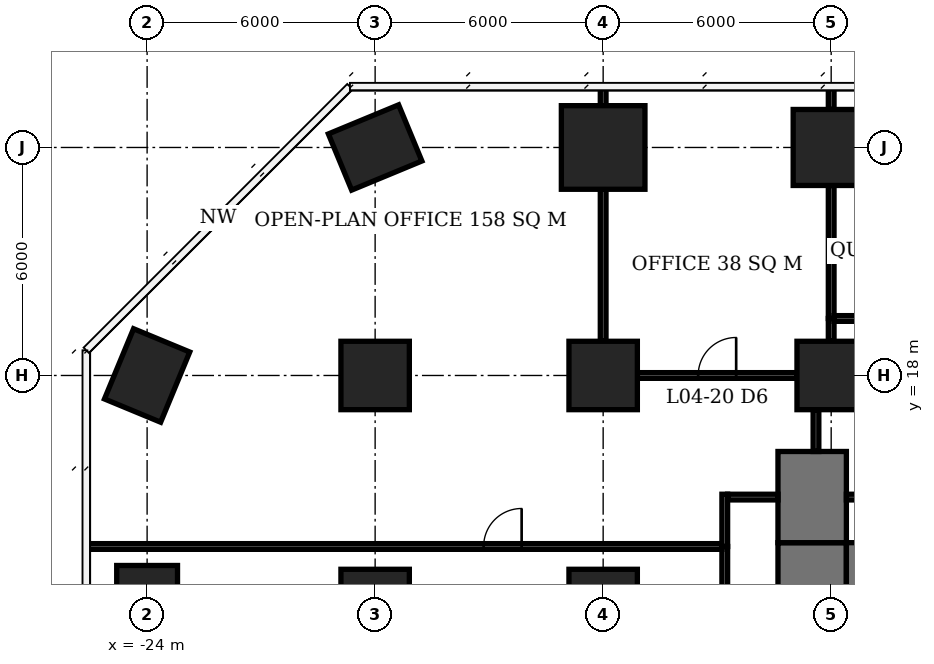
"""IFC4 building model, lengths in metres.
Left out: names, types, materials, properties, quantities, classifications, styles, units other than length and angle.
Written with IfcOpenShell. Run it as: python <this file> out.ifc"""

import sys

from ifc_helpers import new_model, si_unit, direction, frame, frame_2d, origin, origin_2d, place, context, subcontext, project, spatial, rectangle, extrude, element, fill, save


model = new_model("IFC4")
c1 = context("Model", 3, precision=1e-05, world=origin(), true_north=direction((0.0, 1.0)))
c2 = subcontext(c1, "Body", "Model", "MODEL_VIEW")
j1 = project(units=[si_unit("LENGTHUNIT", "METRE"), si_unit("PLANEANGLEUNIT", "RADIAN")], contexts=[c1])
p1 = place(None, origin())
s1 = spatial("IfcSite", under=j1, at=p1, CompositionType="ELEMENT")
p2 = place(p1, origin())
s2 = spatial("IfcBuilding", under=s1, at=p2, CompositionType="ELEMENT")
p3 = place(p2, frame((0.0, 0.0, 22.1)))
s3 = spatial("IfcBuildingStorey", under=s2, at=p3, CompositionType="ELEMENT", Elevation=22.1)
for number, where, z_axis, x_axis in (
    (1, (-24.0, 12.0, 0.0), (0.0, 0.0, 1.0), (0.0, 1.0, 0.0)),
    (2, (-24.0, 18.0, 0.0), (0.0, 0.0, 1.0), (0.383, 0.924, 0.0)),
):
    element("IfcColumn", number, at=place(p3, frame(where, z_axis=z_axis, x_axis=x_axis)), inside=s3, PredefinedType="COLUMN", context=c2, shape_type="SweptSolid", body=[
        extrude(rectangle(XDim=2.0, YDim=1.6, at=origin_2d()), origin(), (0.0, 0.0, 1.0), 3.9),
    ])
for number, where, z_axis, x_axis in (
    (3, (-18.0, 12.0, 0.0), (0.0, 0.0, 1.0), (1.0, 0.0, 0.0)),
    (4, (-18.0, 18.0, 0.0), (0.0, 0.0, 1.0), (1.0, 0.0, 0.0)),
):
    element("IfcColumn", number, at=place(p3, frame(where, z_axis=z_axis, x_axis=x_axis)), inside=s3, PredefinedType="COLUMN", context=c2, shape_type="SweptSolid", body=[
        extrude(rectangle(XDim=1.8, YDim=1.8, at=origin_2d()), origin(), (0.0, 0.0, 1.0), 3.9),
    ])
p4 = place(p3, frame((-18.0, 24.0, 0.0), z_axis=(0.0, 0.0, 1.0), x_axis=(0.923879532511, 0.382683432365, 0.0)))
e5 = element("IfcColumn", 5, at=p4, inside=s3, PredefinedType="COLUMN", context=c2, shape_type="SweptSolid", body=[
    extrude(rectangle(XDim=2.0, YDim=1.6, at=origin_2d()), origin(), (0.0, 0.0, 1.0), 3.9),
])
for number, where, z_axis, x_axis in (
    (6, (-12.0, 12.0, 0.0), (0.0, 0.0, 1.0), (1.0, 0.0, 0.0)),
    (7, (-12.0, 18.0, 0.0), (0.0, 0.0, 1.0), (1.0, 0.0, 0.0)),
):
    element("IfcColumn", number, at=place(p3, frame(where, z_axis=z_axis, x_axis=x_axis)), inside=s3, PredefinedType="COLUMN", context=c2, shape_type="SweptSolid", body=[
        extrude(rectangle(XDim=1.8, YDim=1.8, at=origin_2d()), origin(), (0.0, 0.0, 1.0), 3.9),
    ])
p5 = place(p3, frame((-12.0, 24.0, 0.0), z_axis=(0.0, 0.0, 1.0), x_axis=(1.0, 0.0, 0.0)))
e8 = element("IfcColumn", 8, at=p5, inside=s3, PredefinedType="COLUMN", context=c2, shape_type="SweptSolid", body=[
    extrude(rectangle(XDim=2.2, YDim=2.2, at=origin_2d()), origin(), (0.0, 0.0, 1.0), 3.9),
])
p6 = place(p3, frame((-6.0, 18.0, 0.0), z_axis=(0.0, 0.0, 1.0), x_axis=(1.0, 0.0, 0.0)))
e9 = element("IfcColumn", 9, at=p6, inside=s3, PredefinedType="COLUMN", context=c2, shape_type="SweptSolid", body=[
    extrude(rectangle(XDim=1.8, YDim=1.8, at=origin_2d()), origin(), (0.0, 0.0, 1.0), 3.9),
])
p7 = place(p3, frame((-6.0, 24.0, 0.0), z_axis=(0.0, 0.0, 1.0), x_axis=(1.0, 0.0, 0.0)))
e10 = element("IfcColumn", 10, at=p7, inside=s3, PredefinedType="COLUMN", context=c2, shape_type="SweptSolid", body=[
    extrude(rectangle(XDim=2.0, YDim=2.0, at=origin_2d()), origin(), (0.0, 0.0, 1.0), 3.9),
])
p8 = place(p3, frame((-5.6, 12.6, 0.0), z_axis=(0.0, 0.0, 1.0), x_axis=(1.0, 0.0, 0.0)))
e11 = element("IfcWall", 11, at=p8, inside=s3, PredefinedType="SHEAR", context=c2, shape_type="SweptSolid", body=[
    extrude(rectangle(XDim=23.2, YDim=2.0, at=frame_2d((11.6, 0.0))), origin(), (0.0, 0.0, 1.0), 3.9),
])
p9 = place(p3, frame((-6.5, -7.6, 0.0), z_axis=(0.0, 0.0, 1.0), x_axis=(0.0, 1.0, 0.0)))
e12 = element("IfcWall", 12, at=p9, inside=s3, PredefinedType="SHEAR", context=c2, shape_type="SweptSolid", body=[
    extrude(rectangle(XDim=21.2, YDim=1.8, at=frame_2d((10.6, 0.0))), origin(), (0.0, 0.0, 1.0), 3.9),
])
p10 = place(p9, frame((7.8, 0.0, 0.0)))
e13 = element("IfcOpeningElement", 13, at=p10, cuts=e12, PredefinedType="OPENING", context=c2, shape_type="SweptSolid", body=[
    extrude(rectangle(XDim=1.8, YDim=2.4, at=frame_2d((0.9, 1.2))), frame((0.0, 0.91, 0.0), z_axis=(0.0, -1.0, 0.0), x_axis=(1.0, 0.0, 0.0)), (0.0, 0.0, 1.0), 1.82),
])
p11 = place(p3, frame((-6.5, 13.6, 0.0), z_axis=(0.0, 0.0, 1.0), x_axis=(0.0, 1.0, 0.0)))
e14 = element("IfcWall", 14, at=p11, inside=s3, PredefinedType="SHEAR", context=c2, shape_type="SweptSolid", body=[
    extrude(rectangle(XDim=2.4, YDim=1.8, at=frame_2d((1.2, 0.0))), origin(), (0.0, 0.0, 1.0), 3.9),
])
p12 = place(p3, frame((-11.1, 18.0, 0.0), z_axis=(0.0, 0.0, 1.0), x_axis=(1.0, 0.0, 0.0)))
e15 = element("IfcWall", 15, at=p12, inside=s3, PredefinedType="PARTITIONING", context=c2, shape_type="SweptSolid", body=[
    extrude(rectangle(XDim=4.2, YDim=0.15, at=frame_2d((2.1, 0.0))), origin(), (0.0, 0.0, 1.0), 3.65),
])
p13 = place(p12, frame((1.6, 0.0, 0.0)))
e16 = element("IfcOpeningElement", 16, at=p13, cuts=e15, PredefinedType="OPENING", context=c2, shape_type="SweptSolid", body=[
    extrude(rectangle(XDim=1.0, YDim=2.1, at=frame_2d((0.5, 1.05))), frame((0.0, 0.085, 0.0), z_axis=(0.0, -1.0, 0.0), x_axis=(1.0, 0.0, 0.0)), (0.0, 0.0, 1.0), 0.17),
])
p14 = place(p3, frame((-5.925, 19.5, 0.0), z_axis=(0.0, 0.0, 1.0), x_axis=(1.0, 0.0, 0.0)))
e17 = element("IfcWall", 17, at=p14, inside=s3, PredefinedType="PARTITIONING", context=c2, shape_type="SweptSolid", body=[
    extrude(rectangle(XDim=5.85, YDim=0.15, at=frame_2d((2.925, 0.0))), origin(), (0.0, 0.0, 1.0), 3.65),
])
p15 = place(p14, frame((2.425, 0.0, 0.0)))
e18 = element("IfcOpeningElement", 18, at=p15, cuts=e17, PredefinedType="OPENING", context=c2, shape_type="SweptSolid", body=[
    extrude(rectangle(XDim=1.0, YDim=2.1, at=frame_2d((0.5, 1.05))), frame((0.0, 0.085, 0.0), z_axis=(0.0, -1.0, 0.0), x_axis=(1.0, 0.0, 0.0)), (0.0, 0.0, 1.0), 0.17),
])
p16 = place(p3, frame((-12.0, 18.9, 0.0), z_axis=(0.0, 0.0, 1.0), x_axis=(0.0, 1.0, 0.0)))
e19 = element("IfcWall", 19, at=p16, inside=s3, PredefinedType="PARTITIONING", context=c2, shape_type="SweptSolid", body=[
    extrude(rectangle(XDim=4.0, YDim=0.15, at=frame_2d((2.0, 0.0))), origin(), (0.0, 0.0, 1.0), 3.65),
])
p17 = place(p3, frame((-12.0, 25.1, 0.0), z_axis=(0.0, 0.0, 1.0), x_axis=(0.0, 1.0, 0.0)))
e20 = element("IfcWall", 20, at=p17, inside=s3, PredefinedType="PARTITIONING", context=c2, shape_type="SweptSolid", body=[
    extrude(rectangle(XDim=0.5, YDim=0.15, at=frame_2d((0.25, 0.0))), origin(), (0.0, 0.0, 1.0), 3.65),
])
p18 = place(p3, frame((-6.0, 18.9, 0.0), z_axis=(0.0, 0.0, 1.0), x_axis=(0.0, 1.0, 0.0)))
e21 = element("IfcWall", 21, at=p18, inside=s3, PredefinedType="PARTITIONING", context=c2, shape_type="SweptSolid", body=[
    extrude(rectangle(XDim=0.6, YDim=0.15, at=frame_2d((0.3, 0.0))), origin(), (0.0, 0.0, 1.0), 3.65),
])
p19 = place(p3, frame((-6.0, 19.5, 0.0), z_axis=(0.0, 0.0, 1.0), x_axis=(0.0, 1.0, 0.0)))
e22 = element("IfcWall", 22, at=p19, inside=s3, PredefinedType="PARTITIONING", context=c2, shape_type="SweptSolid", body=[
    extrude(rectangle(XDim=3.5, YDim=0.15, at=frame_2d((1.75, 0.0))), origin(), (0.0, 0.0, 1.0), 3.65),
])
p20 = place(p3, frame((-6.0, 25.0, 0.0), z_axis=(0.0, 0.0, 1.0), x_axis=(0.0, 1.0, 0.0)))
e23 = element("IfcWall", 23, at=p20, inside=s3, PredefinedType="PARTITIONING", context=c2, shape_type="SweptSolid", body=[
    extrude(rectangle(XDim=0.6, YDim=0.15, at=frame_2d((0.3, 0.0))), origin(), (0.0, 0.0, 1.0), 3.65),
])
p21 = place(p3, frame((-25.6, 13.5, 0.0), z_axis=(0.0, 0.0, 1.0), x_axis=(1.0, 0.0, 0.0)))
e24 = element("IfcWall", 24, at=p21, inside=s3, PredefinedType="PARTITIONING", context=c2, shape_type="SweptSolid", body=[
    extrude(rectangle(XDim=16.725, YDim=0.15, at=frame_2d((8.363, 0.0))), origin(), (0.0, 0.0, 1.0), 3.65),
])
p22 = place(p21, frame((10.455, 0.0, 0.0)))
e25 = element("IfcOpeningElement", 25, at=p22, cuts=e24, PredefinedType="OPENING", context=c2, shape_type="SweptSolid", body=[
    extrude(rectangle(XDim=1.0, YDim=2.1, at=frame_2d((0.5, 1.05))), frame((0.0, 0.085, 0.0), z_axis=(0.0, -1.0, 0.0), x_axis=(1.0, 0.0, 0.0)), (0.0, 0.0, 1.0), 0.17),
])
p23 = place(p3, frame((-8.8, 4.575, 0.0), z_axis=(0.0, 0.0, 1.0), x_axis=(0.0, 1.0, 0.0)))
e26 = element("IfcWall", 26, at=p23, inside=s3, PredefinedType="PARTITIONING", context=c2, shape_type="SweptSolid", body=[
    extrude(rectangle(XDim=8.925, YDim=0.15, at=frame_2d((4.462, 0.0))), origin(), (0.0, 0.0, 1.0), 3.65),
])
p24 = place(p23, frame((2.575, 0.0, 0.0)))
e27 = element("IfcOpeningElement", 27, at=p24, cuts=e26, PredefinedType="OPENING", context=c2, shape_type="SweptSolid", body=[
    extrude(rectangle(XDim=1.0, YDim=2.1, at=frame_2d((0.5, 1.05))), frame((0.0, 0.085, 0.0), z_axis=(0.0, -1.0, 0.0), x_axis=(1.0, 0.0, 0.0)), (0.0, 0.0, 1.0), 0.17),
])
p25 = place(p3, frame((-8.8, 13.5, 0.0), z_axis=(0.0, 0.0, 1.0), x_axis=(0.0, 1.0, 0.0)))
e28 = element("IfcWall", 28, at=p25, inside=s3, PredefinedType="PARTITIONING", context=c2, shape_type="SweptSolid", body=[
    extrude(rectangle(XDim=1.375, YDim=0.15, at=frame_2d((0.688, 0.0))), origin(), (0.0, 0.0, 1.0), 3.65),
])
p26 = place(p3, frame((-8.725, 14.8, 0.0), z_axis=(0.0, 0.0, 1.0), x_axis=(1.0, 0.0, 0.0)))
e29 = element("IfcWall", 29, at=p26, inside=s3, PredefinedType="PARTITIONING", context=c2, shape_type="SweptSolid", body=[
    extrude(rectangle(XDim=1.325, YDim=0.15, at=frame_2d((0.663, 0.0))), origin(), (0.0, 0.0, 1.0), 3.65),
])
p27 = place(p3, frame((-6.4, 16.0, 0.0), z_axis=(0.0, 0.0, 1.0), x_axis=(0.0, 1.0, 0.0)))
e30 = element("IfcWall", 30, at=p27, inside=s3, PredefinedType="PARTITIONING", context=c2, shape_type="SweptSolid", body=[
    extrude(rectangle(XDim=1.1, YDim=0.15, at=frame_2d((0.55, 0.0))), origin(), (0.0, 0.0, 1.0), 3.65),
])
p28 = place(p3, frame((-5.6, 14.8, 0.0), z_axis=(0.0, 0.0, 1.0), x_axis=(1.0, 0.0, 0.0)))
e31 = element("IfcWall", 31, at=p28, inside=s3, PredefinedType="PARTITIONING", context=c2, shape_type="SweptSolid", body=[
    extrude(rectangle(XDim=16.025, YDim=0.15, at=frame_2d((8.013, 0.0))), origin(), (0.0, 0.0, 1.0), 3.65),
])
p29 = place(p28, frame((9.965, 0.0, 0.0)))
e32 = element("IfcOpeningElement", 32, at=p29, cuts=e31, PredefinedType="OPENING", context=c2, shape_type="SweptSolid", body=[
    extrude(rectangle(XDim=1.0, YDim=2.1, at=frame_2d((0.5, 1.05))), frame((0.0, 0.085, 0.0), z_axis=(0.0, -1.0, 0.0), x_axis=(1.0, 0.0, 0.0)), (0.0, 0.0, 1.0), 0.17),
])
p30 = place(p13, origin())
e33 = element("IfcDoor", 33, at=p30, inside=s3, OperationType="SINGLE_SWING_RIGHT", PredefinedType="DOOR", context=c2, shape_type="SweptSolid", body=[
    extrude(rectangle(XDim=1.0, YDim=2.1, at=frame_2d((0.5, 1.05))), frame((0.0, 0.025, 0.0), z_axis=(0.0, -1.0, 0.0), x_axis=(1.0, 0.0, 0.0)), (0.0, 0.0, 1.0), 0.05),
])
fill(e16, e33)
p31 = place(p22, origin())
e34 = element("IfcDoor", 34, at=p31, inside=s3, OperationType="SINGLE_SWING_RIGHT", PredefinedType="DOOR", context=c2, shape_type="SweptSolid", body=[
    extrude(rectangle(XDim=1.0, YDim=2.1, at=frame_2d((0.5, 1.05))), frame((0.0, 0.025, 0.0), z_axis=(0.0, -1.0, 0.0), x_axis=(1.0, 0.0, 0.0)), (0.0, 0.0, 1.0), 0.05),
])
fill(e25, e34)
save(model, sys.argv[1])
